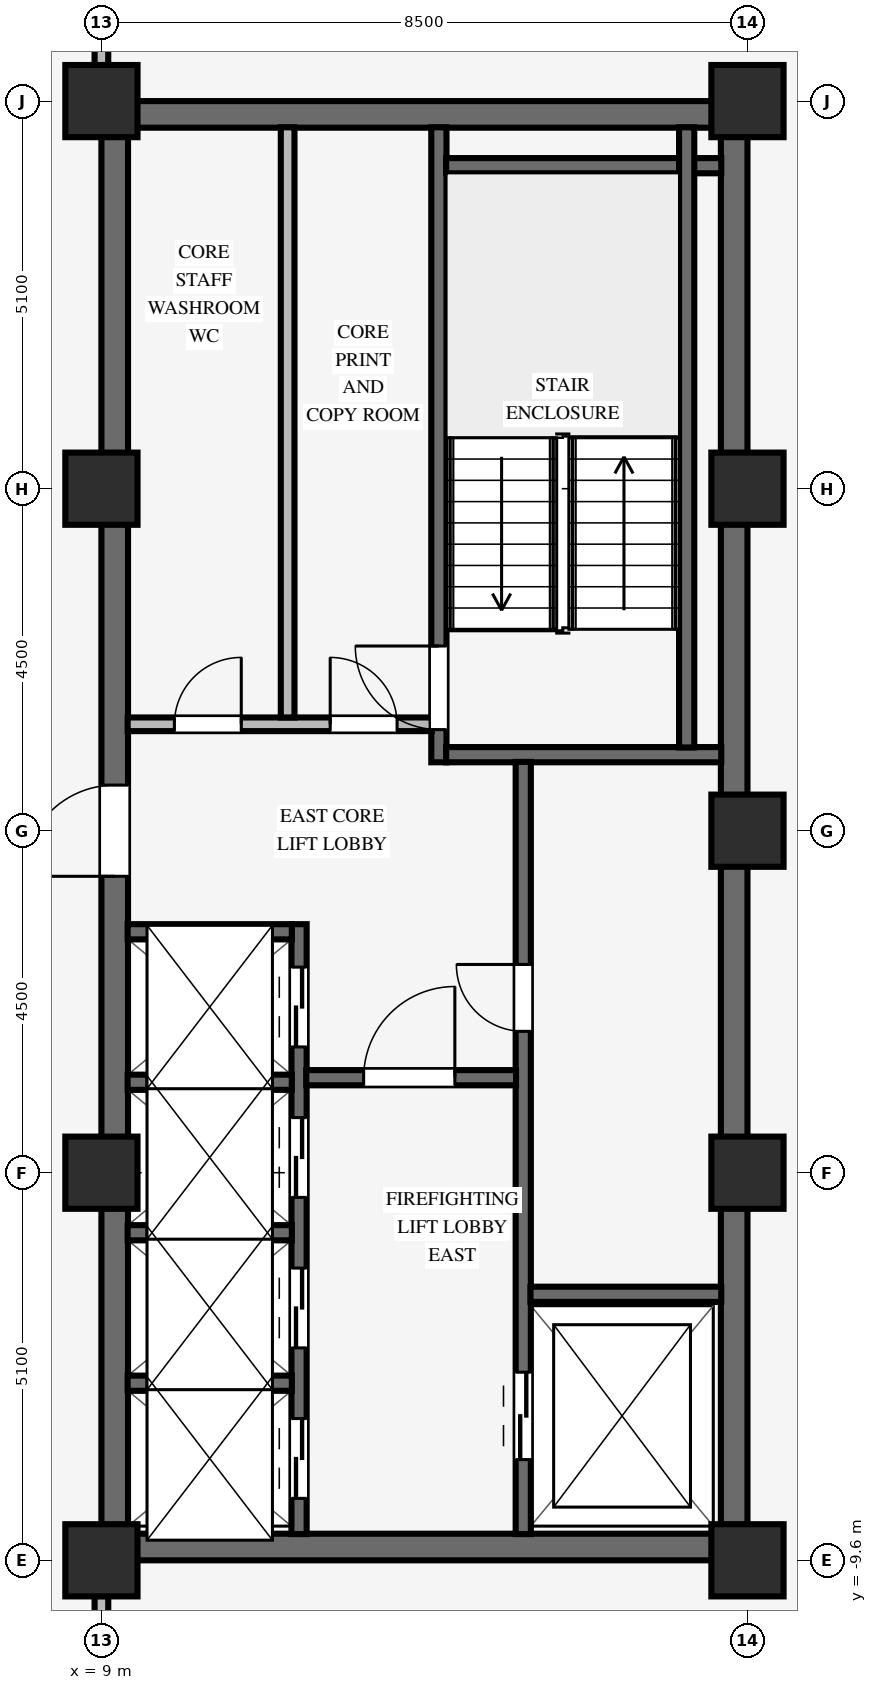
"""IFC4 building model, lengths in metres.
Left out: names, types, materials, properties, quantities, classifications, styles, units other than length and angle.
Written with IfcOpenShell. Run it as: python <this file> out.ifc"""

import sys

from ifc_helpers import new_model, si_unit, direction, frame, frame_2d, origin, origin_2d, place, context, subcontext, project, spatial, rectangle, extrude, source, transform, mapped, element, fill, save


model = new_model("IFC4")
c1 = context("Model", 3, precision=1e-05, world=origin(), true_north=direction((0.0, 1.0)))
c2 = subcontext(c1, "Body", "Model", "MODEL_VIEW")
j1 = project(units=[si_unit("LENGTHUNIT", "METRE"), si_unit("PLANEANGLEUNIT", "RADIAN")], contexts=[c1])
p1 = place(None, origin())
s1 = spatial("IfcSite", under=j1, at=p1, CompositionType="ELEMENT")
p2 = place(p1, origin())
s2 = spatial("IfcBuilding", under=s1, at=p2, CompositionType="ELEMENT")
p3 = place(p2, frame((0.0, 0.0, 216.45)))
s3 = spatial("IfcBuildingStorey", under=s2, at=p3, CompositionType="ELEMENT", Elevation=216.45)
for number, where, z_axis, x_axis in (
    (1, (9.0, -9.425, 0.0), (0.0, 0.0, 1.0), (1.0, 0.0, 0.0)),
    (2, (9.0, 9.425, 0.0), (0.0, 0.0, 1.0), (1.0, 0.0, 0.0)),
):
    element("IfcWall", number, at=place(p3, frame(where, z_axis=z_axis, x_axis=x_axis)), inside=s3, PredefinedType="SHEAR", context=c2, shape_type="SweptSolid", body=[
        extrude(rectangle(XDim=8.5, YDim=0.35, at=frame_2d((4.25, 0.0))), origin(), (0.0, 0.0, 1.0), 3.37),
    ])
p4 = place(p3, frame((9.175, -9.255, 0.0), z_axis=(0.0, 0.0, 1.0), x_axis=(0.0, 1.0, 0.0)))
e3 = element("IfcWall", 3, at=p4, inside=s3, PredefinedType="SHEAR", context=c2, shape_type="SweptSolid", body=[
    extrude(rectangle(XDim=18.51, YDim=0.35, at=frame_2d((9.255, 0.0))), origin(), (0.0, 0.0, 1.0), 3.37),
])
p5 = place(p4, frame((8.655, 0.0, 0.0)))
e4 = element("IfcOpeningElement", 4, at=p5, cuts=e3, PredefinedType="OPENING", context=c2, shape_type="SweptSolid", body=[
    extrude(rectangle(XDim=1.2, YDim=2.15, at=frame_2d((0.6, 1.075))), frame((0.0, 0.185, 0.0), z_axis=(0.0, -1.0, 0.0), x_axis=(1.0, 0.0, 0.0)), (0.0, 0.0, 1.0), 0.37),
])
p6 = place(p3, frame((17.325, -9.255, 0.0), z_axis=(0.0, 0.0, 1.0), x_axis=(0.0, 1.0, 0.0)))
e5 = element("IfcWall", 5, at=p6, inside=s3, PredefinedType="SHEAR", context=c2, shape_type="SweptSolid", body=[
    extrude(rectangle(XDim=18.51, YDim=0.35, at=frame_2d((9.255, 0.0))), origin(), (0.0, 0.0, 1.0), 3.37),
])
for number, where, z_axis, x_axis in (
    (6, (9.0, -9.6, 0.0), (0.0, 0.0, 1.0), (1.0, 0.0, 0.0)),
    (7, (9.0, -4.5, 0.0), (0.0, 0.0, 1.0), (1.0, 0.0, 0.0)),
    (8, (9.0, 4.5, 0.0), (0.0, 0.0, 1.0), (1.0, 0.0, 0.0)),
    (9, (9.0, 9.6, 0.0), (0.0, 0.0, 1.0), (1.0, 0.0, 0.0)),
    (10, (17.5, -9.6, 0.0), (0.0, 0.0, 1.0), (1.0, 0.0, 0.0)),
    (11, (17.5, -4.5, 0.0), (0.0, 0.0, 1.0), (1.0, 0.0, 0.0)),
    (12, (17.5, 4.5, 0.0), (0.0, 0.0, 1.0), (1.0, 0.0, 0.0)),
    (13, (17.5, 9.6, 0.0), (0.0, 0.0, 1.0), (1.0, 0.0, 0.0)),
    (14, (17.5, 0.0, 0.0), (0.0, 0.0, 1.0), (1.0, 0.0, 0.0)),
):
    element("IfcColumn", number, at=place(p3, frame(where, z_axis=z_axis, x_axis=x_axis)), inside=s3, PredefinedType="COLUMN", context=c2, shape_type="SweptSolid", body=[
        extrude(rectangle(XDim=0.95, YDim=0.95, at=origin_2d()), origin(), (0.0, 0.0, 1.0), 3.37),
    ])
p7 = place(p3, frame((13.44, 0.9, 0.0), z_axis=(0.0, 0.0, 1.0), x_axis=(0.0, 1.0, 0.0)))
e15 = element("IfcWall", 15, at=p7, inside=s3, PredefinedType="SHEAR", context=c2, shape_type="SweptSolid", body=[
    extrude(rectangle(XDim=8.355, YDim=0.2, at=frame_2d((4.177, 0.0))), origin(), (0.0, 0.0, 1.0), 3.37),
])
p8 = place(p7, frame((0.43, 0.0, 0.0)))
e16 = element("IfcOpeningElement", 16, at=p8, cuts=e15, PredefinedType="OPENING", context=c2, shape_type="SweptSolid", body=[
    extrude(rectangle(XDim=1.1, YDim=2.15, at=frame_2d((0.55, 1.075))), frame((0.0, 0.11, 0.0), z_axis=(0.0, -1.0, 0.0), x_axis=(1.0, 0.0, 0.0)), (0.0, 0.0, 1.0), 0.22),
])
for number, where, z_axis, x_axis in (
    (17, (13.535, 1.0, 0.0), (0.0, 0.0, 1.0), (1.0, 0.0, 0.0)),
    (18, (13.535, 8.75, 0.0), (0.0, 0.0, 1.0), (1.0, 0.0, 0.0)),
):
    element("IfcWall", number, at=place(p3, frame(where, z_axis=z_axis, x_axis=x_axis)), inside=s3, PredefinedType="SHEAR", context=c2, shape_type="SweptSolid", body=[
        extrude(rectangle(XDim=3.62, YDim=0.2, at=frame_2d((1.81, 0.0))), origin(), (0.0, 0.0, 1.0), 3.37),
    ])
p9 = place(p3, frame((16.7, 1.095, 0.0), z_axis=(0.0, 0.0, 1.0), x_axis=(0.0, 1.0, 0.0)))
e19 = element("IfcWall", 19, at=p9, inside=s3, PredefinedType="SHEAR", context=c2, shape_type="SweptSolid", body=[
    extrude(rectangle(XDim=8.16, YDim=0.2, at=frame_2d((4.08, 0.0))), origin(), (0.0, 0.0, 1.0), 3.37),
])
p10 = place(p3, frame((14.55, -9.255, 0.0), z_axis=(0.0, 0.0, 1.0), x_axis=(0.0, 1.0, 0.0)))
e20 = element("IfcWall", 20, at=p10, inside=s3, PredefinedType="SHEAR", context=c2, shape_type="SweptSolid", body=[
    extrude(rectangle(XDim=10.16, YDim=0.2, at=frame_2d((5.08, 0.0))), origin(), (0.0, 0.0, 1.0), 3.37),
])
p11 = place(p10, frame((6.615, 0.0, 0.0)))
e21 = element("IfcOpeningElement", 21, at=p11, cuts=e20, PredefinedType="OPENING", context=c2, shape_type="SweptSolid", body=[
    extrude(rectangle(XDim=0.88, YDim=2.1, at=frame_2d((0.44, 1.05))), frame((0.0, 0.11, 0.0), z_axis=(0.0, -1.0, 0.0), x_axis=(1.0, 0.0, 0.0)), (0.0, 0.0, 1.0), 0.22),
])
p12 = place(p10, frame((0.98, 0.0, 0.0)))
e22 = element("IfcOpeningElement", 22, at=p12, cuts=e20, PredefinedType="OPENING", context=c2, shape_type="SweptSolid", body=[
    extrude(rectangle(XDim=1.15, YDim=2.15, at=frame_2d((0.575, 1.075))), frame((0.0, 0.11, 0.0), z_axis=(0.0, -1.0, 0.0), x_axis=(1.0, 0.0, 0.0)), (0.0, 0.0, 1.0), 0.22),
])
p13 = place(p3, frame((14.645, -6.1, 0.0), z_axis=(0.0, 0.0, 1.0), x_axis=(1.0, 0.0, 0.0)))
e23 = element("IfcWall", 23, at=p13, inside=s3, PredefinedType="SHEAR", context=c2, shape_type="SweptSolid", body=[
    extrude(rectangle(XDim=2.51, YDim=0.2, at=frame_2d((1.255, 0.0))), origin(), (0.0, 0.0, 1.0), 3.37),
])
p14 = place(p3, frame((11.6, -9.255, 0.0), z_axis=(0.0, 0.0, 1.0), x_axis=(0.0, 1.0, 0.0)))
e24 = element("IfcWall", 24, at=p14, inside=s3, PredefinedType="SHEAR", context=c2, shape_type="SweptSolid", body=[
    extrude(rectangle(XDim=8.025, YDim=0.2, at=frame_2d((4.012, 0.0))), origin(), (0.0, 0.0, 1.0), 3.37),
])
p15 = place(p14, frame((0.47, 0.0, 0.0)))
e25 = element("IfcOpeningElement", 25, at=p15, cuts=e24, PredefinedType="OPENING", context=c2, shape_type="SweptSolid", body=[
    extrude(rectangle(XDim=1.05, YDim=2.15, at=frame_2d((0.525, 1.075))), frame((0.0, 0.11, 0.0), z_axis=(0.0, -1.0, 0.0), x_axis=(1.0, 0.0, 0.0)), (0.0, 0.0, 1.0), 0.22),
])
p16 = place(p14, frame((2.45, 0.0, 0.0)))
e26 = element("IfcOpeningElement", 26, at=p16, cuts=e24, PredefinedType="OPENING", context=c2, shape_type="SweptSolid", body=[
    extrude(rectangle(XDim=1.05, YDim=2.15, at=frame_2d((0.525, 1.075))), frame((0.0, 0.11, 0.0), z_axis=(0.0, -1.0, 0.0), x_axis=(1.0, 0.0, 0.0)), (0.0, 0.0, 1.0), 0.22),
])
p17 = place(p14, frame((4.43, 0.0, 0.0)))
e27 = element("IfcOpeningElement", 27, at=p17, cuts=e24, PredefinedType="OPENING", context=c2, shape_type="SweptSolid", body=[
    extrude(rectangle(XDim=1.05, YDim=2.15, at=frame_2d((0.525, 1.075))), frame((0.0, 0.11, 0.0), z_axis=(0.0, -1.0, 0.0), x_axis=(1.0, 0.0, 0.0)), (0.0, 0.0, 1.0), 0.22),
])
p18 = place(p14, frame((6.41, 0.0, 0.0)))
e28 = element("IfcOpeningElement", 28, at=p18, cuts=e24, PredefinedType="OPENING", context=c2, shape_type="SweptSolid", body=[
    extrude(rectangle(XDim=1.05, YDim=2.15, at=frame_2d((0.525, 1.075))), frame((0.0, 0.11, 0.0), z_axis=(0.0, -1.0, 0.0), x_axis=(1.0, 0.0, 0.0)), (0.0, 0.0, 1.0), 0.22),
])
p19 = place(p3, frame((11.695, -3.25, 0.0), z_axis=(0.0, 0.0, 1.0), x_axis=(1.0, 0.0, 0.0)))
e29 = element("IfcWall", 29, at=p19, inside=s3, PredefinedType="SHEAR", context=c2, shape_type="SweptSolid", body=[
    extrude(rectangle(XDim=2.76, YDim=0.2, at=frame_2d((1.38, 0.0))), origin(), (0.0, 0.0, 1.0), 3.37),
])
p20 = place(p19, frame((0.755, 0.0, 0.0)))
e30 = element("IfcOpeningElement", 30, at=p20, cuts=e29, PredefinedType="OPENING", context=c2, shape_type="SweptSolid", body=[
    extrude(rectangle(XDim=1.2, YDim=2.15, at=frame_2d((0.6, 1.075))), frame((0.0, 0.11, 0.0), z_axis=(0.0, -1.0, 0.0), x_axis=(1.0, 0.0, 0.0)), (0.0, 0.0, 1.0), 0.22),
])
for number, where, z_axis, x_axis in (
    (31, (9.345, -7.27, 0.0), (0.0, 0.0, 1.0), (1.0, 0.0, 0.0)),
    (32, (9.345, -5.29, 0.0), (0.0, 0.0, 1.0), (1.0, 0.0, 0.0)),
    (33, (9.345, -3.31, 0.0), (0.0, 0.0, 1.0), (1.0, 0.0, 0.0)),
    (34, (9.345, -1.33, 0.0), (0.0, 0.0, 1.0), (1.0, 0.0, 0.0)),
):
    element("IfcWall", number, at=place(p3, frame(where, z_axis=z_axis, x_axis=x_axis)), inside=s3, PredefinedType="SHEAR", context=c2, shape_type="SweptSolid", body=[
        extrude(rectangle(XDim=2.16, YDim=0.2, at=frame_2d((1.08, 0.0))), origin(), (0.0, 0.0, 1.0), 3.37),
    ])
p21 = place(p3, frame((9.345, 1.4, 0.0), z_axis=(0.0, 0.0, 1.0), x_axis=(1.0, 0.0, 0.0)))
e35 = element("IfcWall", 35, at=p21, inside=s3, PredefinedType="PARTITIONING", context=c2, shape_type="SweptSolid", body=[
    extrude(rectangle(XDim=4.0, YDim=0.18, at=frame_2d((2.0, 0.0))), origin(), (0.0, 0.0, 1.0), 3.36),
])
p22 = place(p21, frame((0.615, 0.0, 0.0)))
e36 = element("IfcOpeningElement", 36, at=p22, cuts=e35, PredefinedType="OPENING", context=c2, shape_type="SweptSolid", body=[
    extrude(rectangle(XDim=0.88, YDim=2.1, at=frame_2d((0.44, 1.05))), frame((0.0, 0.1, 0.0), z_axis=(0.0, -1.0, 0.0), x_axis=(1.0, 0.0, 0.0)), (0.0, 0.0, 1.0), 0.2),
])
p23 = place(p21, frame((2.665, 0.0, 0.0)))
e37 = element("IfcOpeningElement", 37, at=p23, cuts=e35, PredefinedType="OPENING", context=c2, shape_type="SweptSolid", body=[
    extrude(rectangle(XDim=0.88, YDim=2.1, at=frame_2d((0.44, 1.05))), frame((0.0, 0.1, 0.0), z_axis=(0.0, -1.0, 0.0), x_axis=(1.0, 0.0, 0.0)), (0.0, 0.0, 1.0), 0.2),
])
p24 = place(p3, frame((11.45, 1.49, 0.0), z_axis=(0.0, 0.0, 1.0), x_axis=(0.0, 1.0, 0.0)))
e38 = element("IfcWall", 38, at=p24, inside=s3, PredefinedType="PARTITIONING", context=c2, shape_type="SweptSolid", body=[
    extrude(rectangle(XDim=7.765, YDim=0.18, at=frame_2d((3.882, 0.0))), origin(), (0.0, 0.0, 1.0), 3.36),
])
for number, where, z_axis, x_axis in (
    (39, (9.0, -15.814, 0.0), (0.0, 0.0, 1.0), (0.0, 1.0, 0.0)),
    (40, (9.0, 10.071, 0.0), (0.0, 0.0, 1.0), (0.0, 1.0, 0.0)),
):
    element("IfcWall", number, at=place(p3, frame(where, z_axis=z_axis, x_axis=x_axis)), inside=s3, PredefinedType="PARTITIONING", context=c2, shape_type="SweptSolid", body=[
        extrude(rectangle(XDim=5.743, YDim=0.18, at=frame_2d((2.872, 0.0))), origin(), (0.0, 0.0, 1.0), 2.816),
    ])
m1 = source(origin(), c2, "Body", "SweptSolid", [
    extrude(rectangle(XDim=1.1, YDim=2.15, at=frame_2d((0.55, 1.075))), frame((0.0, 0.025, 0.0), z_axis=(0.0, -1.0, 0.0), x_axis=(1.0, 0.0, 0.0)), (0.0, 0.0, 1.0), 0.05),
])
p25 = place(p8, origin())
e41 = element("IfcDoor", 41, at=p25, inside=s3, OperationType="SINGLE_SWING_RIGHT", PredefinedType="DOOR", context=c2, shape_type="MappedRepresentation", body=[
    mapped(m1, transform((0.0, 0.0, 0.0), scale=1.0)),
])
fill(e16, e41)
m2 = source(origin(), c2, "Body", "SweptSolid", [
    extrude(rectangle(XDim=0.88, YDim=2.1, at=frame_2d((0.44, 1.05))), frame((0.0, 0.025, 0.0), z_axis=(0.0, -1.0, 0.0), x_axis=(1.0, 0.0, 0.0)), (0.0, 0.0, 1.0), 0.05),
])
p26 = place(p11, origin())
e42 = element("IfcDoor", 42, at=p26, inside=s3, OperationType="SINGLE_SWING_RIGHT", PredefinedType="DOOR", context=c2, shape_type="MappedRepresentation", body=[
    mapped(m2, transform((0.0, 0.0, 0.0), scale=1.0)),
])
fill(e21, e42)
m3 = source(origin(), c2, "Body", "SweptSolid", [
    extrude(rectangle(XDim=1.2, YDim=2.15, at=frame_2d((0.6, 1.075))), frame((0.0, 0.025, 0.0), z_axis=(0.0, -1.0, 0.0), x_axis=(1.0, 0.0, 0.0)), (0.0, 0.0, 1.0), 0.05),
])
p27 = place(p20, origin())
e43 = element("IfcDoor", 43, at=p27, inside=s3, OperationType="SINGLE_SWING_RIGHT", PredefinedType="DOOR", context=c2, shape_type="MappedRepresentation", body=[
    mapped(m3, transform((0.0, 0.0, 0.0), scale=1.0)),
])
fill(e30, e43)
p28 = place(p5, origin())
e44 = element("IfcDoor", 44, at=p28, inside=s3, OperationType="SINGLE_SWING_LEFT", PredefinedType="DOOR", context=c2, shape_type="MappedRepresentation", body=[
    mapped(m3, transform((0.0, 0.0, 0.0), scale=1.0)),
])
fill(e4, e44)
p29 = place(p22, origin())
e45 = element("IfcDoor", 45, at=p29, inside=s3, OperationType="SINGLE_SWING_RIGHT", PredefinedType="DOOR", context=c2, shape_type="MappedRepresentation", body=[
    mapped(m2, transform((0.0, 0.0, 0.0), scale=1.0)),
])
fill(e36, e45)
p30 = place(p23, origin())
e46 = element("IfcDoor", 46, at=p30, inside=s3, OperationType="SINGLE_SWING_LEFT", PredefinedType="DOOR", context=c2, shape_type="MappedRepresentation", body=[
    mapped(m2, transform((0.0, 0.0, 0.0), scale=1.0)),
])
fill(e37, e46)
m4 = source(origin(), c2, "Body", "SweptSolid", [
    extrude(rectangle(XDim=1.15, YDim=2.15, at=frame_2d((0.575, 1.075))), frame((0.0, 0.025, 0.0), z_axis=(0.0, -1.0, 0.0), x_axis=(1.0, 0.0, 0.0)), (0.0, 0.0, 1.0), 0.05),
])
p31 = place(p12, origin())
e47 = element("IfcDoor", 47, at=p31, inside=s3, OperationType="DOUBLE_DOOR_SLIDING", PredefinedType="DOOR", context=c2, shape_type="MappedRepresentation", body=[
    mapped(m4, transform((0.0, 0.0, 0.0), scale=1.0)),
])
fill(e22, e47)
m5 = source(origin(), c2, "Body", "SweptSolid", [
    extrude(rectangle(XDim=1.05, YDim=2.15, at=frame_2d((0.525, 1.075))), frame((0.0, 0.025, 0.0), z_axis=(0.0, -1.0, 0.0), x_axis=(1.0, 0.0, 0.0)), (0.0, 0.0, 1.0), 0.05),
])
p32 = place(p15, origin())
e48 = element("IfcDoor", 48, at=p32, inside=s3, OperationType="DOUBLE_DOOR_SLIDING", PredefinedType="DOOR", context=c2, shape_type="MappedRepresentation", body=[
    mapped(m5, transform((0.0, 0.0, 0.0), scale=1.0)),
])
fill(e25, e48)
p33 = place(p16, origin())
e49 = element("IfcDoor", 49, at=p33, inside=s3, OperationType="DOUBLE_DOOR_SLIDING", PredefinedType="DOOR", context=c2, shape_type="MappedRepresentation", body=[
    mapped(m5, transform((0.0, 0.0, 0.0), scale=1.0)),
])
fill(e26, e49)
p34 = place(p17, origin())
e50 = element("IfcDoor", 50, at=p34, inside=s3, OperationType="DOUBLE_DOOR_SLIDING", PredefinedType="DOOR", context=c2, shape_type="MappedRepresentation", body=[
    mapped(m5, transform((0.0, 0.0, 0.0), scale=1.0)),
])
fill(e27, e50)
p35 = place(p18, origin())
e51 = element("IfcDoor", 51, at=p35, inside=s3, OperationType="DOUBLE_DOOR_SLIDING", PredefinedType="DOOR", context=c2, shape_type="MappedRepresentation", body=[
    mapped(m5, transform((0.0, 0.0, 0.0), scale=1.0)),
])
fill(e28, e51)
save(model, sys.argv[1])
